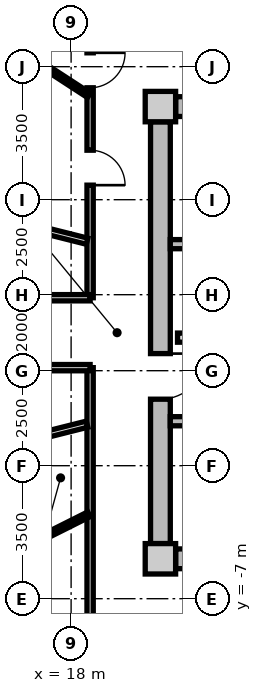
"""IFC4 building model, lengths in metres.
Left out: names, types, materials, properties, quantities, classifications, styles, units other than length and angle.
Written with IfcOpenShell. Run it as: python <this file> out.ifc"""

import sys

from ifc_helpers import new_model, si_unit, direction, frame, frame_2d, origin, origin_2d, place, context, subcontext, project, spatial, rectangle, extrude, source, transform, mapped, element, fill, save


model = new_model("IFC4")
c1 = context("Model", 3, precision=1e-05, world=origin(), true_north=direction((0.0, 1.0)))
c2 = subcontext(c1, "Body", "Model", "MODEL_VIEW")
j1 = project(units=[si_unit("LENGTHUNIT", "METRE"), si_unit("PLANEANGLEUNIT", "RADIAN")], contexts=[c1])
p1 = place(None, origin())
s1 = spatial("IfcSite", under=j1, at=p1, CompositionType="ELEMENT")
p2 = place(p1, origin())
s2 = spatial("IfcBuilding", under=s1, at=p2, CompositionType="ELEMENT")
p3 = place(p2, frame((0.0, 0.0, 207.8)))
s3 = spatial("IfcBuildingStorey", under=s2, at=p3, CompositionType="ELEMENT", Elevation=207.8)
m1 = source(origin(), c2, "Body", "SweptSolid", [
    extrude(rectangle(XDim=0.8, YDim=0.8, at=origin_2d()), origin(), (0.0, 0.0, 1.0), 3.05),
])
for number, where, z_axis, x_axis in (
    (1, (20.35, -5.95, 0.0), (0.0, 0.0, 1.0), (1.0, 0.0, 0.0)),
    (2, (20.35, 5.95, 0.0), (0.0, 0.0, 1.0), (1.0, 0.0, 0.0)),
):
    element("IfcColumn", number, at=place(p3, frame(where, z_axis=z_axis, x_axis=x_axis)), inside=s3, PredefinedType="COLUMN", context=c2, shape_type="MappedRepresentation", body=[
        mapped(m1, transform((0.0, 0.0, 0.0), x_axis=(1.0, 0.0, 0.0), y_axis=(0.0, 1.0, 0.0), z_axis=(0.0, 0.0, 1.0), scale=1.0)),
    ])
m2 = source(origin(), c2, "Body", "SweptSolid", [
    extrude(rectangle(XDim=14.5, YDim=0.52, at=frame_2d((7.25, 0.0))), origin(), (0.0, 0.0, 1.0), 2.76),
])
for number, where, z_axis, x_axis in (
    (3, (20.75, 5.95, 0.0), (0.0, 0.0, 1.0), (1.0, 0.0, 0.0)),
    (4, (35.25, -5.95, 0.0), (0.0, 0.0, 1.0), (-1.0, 0.0, 0.0)),
):
    element("IfcWall", number, at=place(p3, frame(where, z_axis=z_axis, x_axis=x_axis)), inside=s3, PredefinedType="SHEAR", context=c2, shape_type="MappedRepresentation", body=[
        mapped(m2, transform((0.0, 0.0, 0.0), x_axis=(1.0, 0.0, 0.0), y_axis=(0.0, 1.0, 0.0), z_axis=(0.0, 0.0, 1.0), scale=1.0)),
    ])
m3 = source(origin(), c2, "Body", "SweptSolid", [
    extrude(rectangle(XDim=11.1, YDim=0.52, at=frame_2d((5.55, 0.0))), origin(), (0.0, 0.0, 1.0), 2.76),
])
p4 = place(p3, frame((20.35, -5.55, 0.0), z_axis=(0.0, 0.0, 1.0), x_axis=(0.0, 1.0, 0.0)))
e5 = element("IfcWall", 5, at=p4, inside=s3, PredefinedType="SHEAR", context=c2, shape_type="MappedRepresentation", body=[
    mapped(m3, transform((0.0, 0.0, 0.0), x_axis=(1.0, 0.0, 0.0), y_axis=(0.0, 1.0, 0.0), z_axis=(0.0, 0.0, 1.0), scale=1.0)),
])
p5 = place(p4, frame((3.8, 0.0, 0.0)))
e6 = element("IfcOpeningElement", 6, at=p5, cuts=e5, PredefinedType="OPENING", context=c2, shape_type="SweptSolid", body=[
    extrude(rectangle(XDim=1.2, YDim=2.15, at=frame_2d((0.6, 1.075))), frame((0.0, 0.27, 0.0), z_axis=(0.0, -1.0, 0.0), x_axis=(1.0, 0.0, 0.0)), (0.0, 0.0, 1.0), 0.54),
])
m4 = source(origin(), c2, "Body", "SweptSolid", [
    extrude(rectangle(XDim=7.93, YDim=0.24, at=frame_2d((3.965, 0.0))), origin(), (0.0, 0.0, 1.0), 2.76),
])
p6 = place(p3, frame((20.61, 2.33, 0.0), z_axis=(0.0, 0.0, 1.0), x_axis=(1.0, 0.0, 0.0)))
e7 = element("IfcWall", 7, at=p6, inside=s3, PredefinedType="PARTITIONING", context=c2, shape_type="MappedRepresentation", body=[
    mapped(m4, transform((0.0, 0.0, 0.0), x_axis=(1.0, 0.0, 0.0), y_axis=(0.0, 1.0, 0.0), z_axis=(0.0, 0.0, 1.0), scale=1.0)),
])
p7 = place(p3, frame((20.61, -2.33, 0.0), z_axis=(0.0, 0.0, 1.0), x_axis=(1.0, 0.0, 0.0)))
e8 = element("IfcWall", 8, at=p7, inside=s3, PredefinedType="PARTITIONING", context=c2, shape_type="MappedRepresentation", body=[
    mapped(m4, transform((0.0, 0.0, 0.0), x_axis=(1.0, 0.0, 0.0), y_axis=(0.0, 1.0, 0.0), z_axis=(0.0, 0.0, 1.0), scale=1.0)),
])
p8 = place(p7, frame((1.05, 0.0, 0.0)))
e9 = element("IfcOpeningElement", 9, at=p8, cuts=e8, PredefinedType="OPENING", context=c2, shape_type="SweptSolid", body=[
    extrude(rectangle(XDim=1.1, YDim=2.15, at=frame_2d((0.55, 1.075))), frame((0.0, 0.13, 0.0), z_axis=(0.0, -1.0, 0.0), x_axis=(1.0, 0.0, 0.0)), (0.0, 0.0, 1.0), 0.26),
])
m5 = source(origin(), c2, "Body", "SweptSolid", [
    extrude(rectangle(XDim=7.62, YDim=0.24, at=frame_2d((3.81, 0.0))), origin(), (0.0, 0.0, 1.0), 2.745),
])
p9 = place(p3, frame((20.8, -0.13, 0.0), z_axis=(0.0, 0.0, 1.0), x_axis=(1.0, 0.0, 0.0)))
e10 = element("IfcWall", 10, at=p9, inside=s3, PredefinedType="PARTITIONING", context=c2, shape_type="MappedRepresentation", body=[
    mapped(m5, transform((0.0, 0.0, 0.0), x_axis=(1.0, 0.0, 0.0), y_axis=(0.0, 1.0, 0.0), z_axis=(0.0, 0.0, 1.0), scale=1.0)),
])
p10 = place(p9, frame((6.22, 0.0, 0.0)))
e11 = element("IfcOpeningElement", 11, at=p10, cuts=e10, PredefinedType="OPENING", context=c2, shape_type="SweptSolid", body=[
    extrude(rectangle(XDim=1.0, YDim=2.1, at=frame_2d((0.5, 1.05))), frame((0.0, 0.13, 0.0), z_axis=(0.0, -1.0, 0.0), x_axis=(1.0, 0.0, 0.0)), (0.0, 0.0, 1.0), 0.26),
])
p11 = place(p9, frame((2.4, 0.0, 0.0)))
e12 = element("IfcOpeningElement", 12, at=p11, cuts=e10, PredefinedType="OPENING", context=c2, shape_type="SweptSolid", body=[
    extrude(rectangle(XDim=1.0, YDim=2.1, at=frame_2d((0.5, 1.05))), frame((0.0, 0.13, 0.0), z_axis=(0.0, -1.0, 0.0), x_axis=(1.0, 0.0, 0.0)), (0.0, 0.0, 1.0), 0.26),
])
m6 = source(origin(), c2, "Body", "SweptSolid", [
    extrude(rectangle(XDim=6.88, YDim=0.165, at=frame_2d((3.44, 0.0))), origin(), (0.0, 0.0, 1.0), 2.745),
])
p12 = place(p3, frame((18.5, -7.8, 0.0), z_axis=(0.0, 0.0, 1.0), x_axis=(0.0, 1.0, 0.0)))
e13 = element("IfcWall", 13, at=p12, inside=s3, PredefinedType="PARTITIONING", context=c2, shape_type="MappedRepresentation", body=[
    mapped(m6, transform((0.0, 0.0, 0.0), x_axis=(1.0, 0.0, 0.0), y_axis=(0.0, 1.0, 0.0), z_axis=(0.0, 0.0, 1.0), scale=1.0)),
])
p13 = place(p3, frame((18.5, 0.92, 0.0), z_axis=(0.0, 0.0, 1.0), x_axis=(0.0, 1.0, 0.0)))
e14 = element("IfcWall", 14, at=p13, inside=s3, PredefinedType="PARTITIONING", context=c2, shape_type="MappedRepresentation", body=[
    mapped(m6, transform((0.0, 0.0, 0.0), x_axis=(1.0, 0.0, 0.0), y_axis=(0.0, 1.0, 0.0), z_axis=(0.0, 0.0, 1.0), scale=1.0)),
])
p14 = place(p13, frame((5.525, 0.0, 0.0)))
e15 = element("IfcOpeningElement", 15, at=p14, cuts=e14, PredefinedType="OPENING", context=c2, shape_type="SweptSolid", body=[
    extrude(rectangle(XDim=0.92, YDim=2.1, at=frame_2d((0.46, 1.05))), frame((0.0, 0.093, 0.0), z_axis=(0.0, -1.0, 0.0), x_axis=(1.0, 0.0, 0.0)), (0.0, 0.0, 1.0), 0.185),
])
p15 = place(p13, frame((2.962, 0.0, 0.0)))
e16 = element("IfcOpeningElement", 16, at=p15, cuts=e14, PredefinedType="OPENING", context=c2, shape_type="SweptSolid", body=[
    extrude(rectangle(XDim=0.92, YDim=2.1, at=frame_2d((0.46, 1.05))), frame((0.0, 0.093, 0.0), z_axis=(0.0, -1.0, 0.0), x_axis=(1.0, 0.0, 0.0)), (0.0, 0.0, 1.0), 0.185),
])
m7 = source(origin(), c2, "Body", "SweptSolid", [
    extrude(rectangle(XDim=6.157, YDim=0.165, at=frame_2d((3.079, 0.0))), origin(), (0.0, 0.0, 1.0), 2.345),
])
for number, where, z_axis, x_axis in (
    (17, (18.42, 2.407, 0.0), (0.0, 0.0, 1.0), (-0.97, 0.244, 0.0)),
    (18, (18.42, -2.407, 0.0), (0.0, 0.0, 1.0), (-0.97, -0.244, 0.0)),
):
    element("IfcWall", number, at=place(p3, frame(where, z_axis=z_axis, x_axis=x_axis)), inside=s3, PredefinedType="PARTITIONING", context=c2, shape_type="MappedRepresentation", body=[
        mapped(m7, transform((0.0, 0.0, 0.0), x_axis=(1.0, 0.0, 0.0), y_axis=(0.0, 1.0, 0.0), z_axis=(0.0, 0.0, 1.0), scale=1.0)),
    ])
m8 = source(origin(), c2, "Body", "SweptSolid", [
    extrude(rectangle(XDim=3.904, YDim=0.14, at=frame_2d((1.952, 0.0))), origin(), (0.0, 0.0, 1.0), 2.745),
])
p16 = place(p3, frame((18.47, 6.246, 0.0), z_axis=(0.0, 0.0, 1.0), x_axis=(-0.838024687996, 0.545632314209, 0.0)))
e19 = element("IfcWall", 19, at=p16, inside=s3, PredefinedType="PARTITIONING", context=c2, shape_type="MappedRepresentation", body=[
    mapped(m8, transform((0.0, 0.0, 0.0), x_axis=(1.0, 0.0, 0.0), y_axis=(0.0, 1.0, 0.0), z_axis=(0.0, 0.0, 1.0), scale=1.0)),
])
m9 = source(origin(), c2, "Body", "SweptSolid", [
    extrude(rectangle(XDim=1.638, YDim=0.14, at=frame_2d((0.819, 0.0))), origin(), (0.0, 0.0, 1.0), 2.745),
])
p17 = place(p3, frame((18.47, -4.778, 0.0), z_axis=(0.0, 0.0, 1.0), x_axis=(-0.893919977945, -0.448226586707, 0.0)))
e20 = element("IfcWall", 20, at=p17, inside=s3, PredefinedType="PARTITIONING", context=c2, shape_type="MappedRepresentation", body=[
    mapped(m9, transform((0.0, 0.0, 0.0), x_axis=(1.0, 0.0, 0.0), y_axis=(0.0, 1.0, 0.0), z_axis=(0.0, 0.0, 1.0), scale=1.0)),
])
m10 = source(origin(), c2, "Body", "SweptSolid", [
    extrude(rectangle(XDim=3.472, YDim=0.115, at=frame_2d((1.736, 0.0))), origin(), (0.0, 0.0, 1.0), 2.745),
])
p18 = place(p3, frame((16.396, -6.317, 0.0), z_axis=(0.0, 0.0, 1.0), x_axis=(0.485804139346, -0.874067696574, 0.0)))
e21 = element("IfcWall", 21, at=p18, inside=s3, PredefinedType="PARTITIONING", context=c2, shape_type="MappedRepresentation", body=[
    mapped(m10, transform((0.0, 0.0, 0.0), x_axis=(1.0, 0.0, 0.0), y_axis=(0.0, 1.0, 0.0), z_axis=(0.0, 0.0, 1.0), scale=1.0)),
])
p19 = place(p18, frame((1.261, 0.0, 0.0)))
e22 = element("IfcOpeningElement", 22, at=p19, cuts=e21, PredefinedType="OPENING", context=c2, shape_type="SweptSolid", body=[
    extrude(rectangle(XDim=0.95, YDim=2.1, at=frame_2d((0.475, 1.05))), frame((0.0, 0.067, 0.0), z_axis=(0.0, -1.0, 0.0), x_axis=(1.0, 0.0, 0.0)), (0.0, 0.0, 1.0), 0.135),
])
m11 = source(origin(), c2, "Body", "SweptSolid", [
    extrude(rectangle(XDim=37.0, YDim=0.165, at=frame_2d((18.5, 0.0))), origin(), (0.0, 0.0, 1.0), 2.745),
])
p20 = place(p3, frame((-18.5, -0.92, 0.0), z_axis=(0.0, 0.0, 1.0), x_axis=(1.0, 0.0, 0.0)))
e23 = element("IfcWall", 23, at=p20, inside=s3, PredefinedType="PARTITIONING", context=c2, shape_type="MappedRepresentation", body=[
    mapped(m11, transform((0.0, 0.0, 0.0), x_axis=(1.0, 0.0, 0.0), y_axis=(0.0, 1.0, 0.0), z_axis=(0.0, 0.0, 1.0), scale=1.0)),
])
p21 = place(p20, frame((2.662, 0.0, 0.0)))
e24 = element("IfcOpeningElement", 24, at=p21, cuts=e23, PredefinedType="OPENING", context=c2, shape_type="SweptSolid", body=[
    extrude(rectangle(XDim=0.95, YDim=2.1, at=frame_2d((0.475, 1.05))), frame((0.0, 0.093, 0.0), z_axis=(0.0, -1.0, 0.0), x_axis=(1.0, 0.0, 0.0)), (0.0, 0.0, 1.0), 0.185),
])
p22 = place(p20, frame((33.388, 0.0, 0.0)))
e25 = element("IfcOpeningElement", 25, at=p22, cuts=e23, PredefinedType="OPENING", context=c2, shape_type="SweptSolid", body=[
    extrude(rectangle(XDim=0.95, YDim=2.1, at=frame_2d((0.475, 1.05))), frame((0.0, 0.093, 0.0), z_axis=(0.0, -1.0, 0.0), x_axis=(1.0, 0.0, 0.0)), (0.0, 0.0, 1.0), 0.185),
])
p23 = place(p20, frame((9.075, 0.0, 0.0)))
e26 = element("IfcOpeningElement", 26, at=p23, cuts=e23, PredefinedType="OPENING", context=c2, shape_type="SweptSolid", body=[
    extrude(rectangle(XDim=1.25, YDim=2.2, at=frame_2d((0.625, 1.1))), frame((0.0, 0.093, 0.0), z_axis=(0.0, -1.0, 0.0), x_axis=(1.0, 0.0, 0.0)), (0.0, 0.0, 1.0), 0.185),
])
p24 = place(p20, frame((14.875, 0.0, 0.0)))
e27 = element("IfcOpeningElement", 27, at=p24, cuts=e23, PredefinedType="OPENING", context=c2, shape_type="SweptSolid", body=[
    extrude(rectangle(XDim=1.25, YDim=2.2, at=frame_2d((0.625, 1.1))), frame((0.0, 0.093, 0.0), z_axis=(0.0, -1.0, 0.0), x_axis=(1.0, 0.0, 0.0)), (0.0, 0.0, 1.0), 0.185),
])
p25 = place(p20, frame((20.875, 0.0, 0.0)))
e28 = element("IfcOpeningElement", 28, at=p25, cuts=e23, PredefinedType="OPENING", context=c2, shape_type="SweptSolid", body=[
    extrude(rectangle(XDim=1.25, YDim=2.2, at=frame_2d((0.625, 1.1))), frame((0.0, 0.093, 0.0), z_axis=(0.0, -1.0, 0.0), x_axis=(1.0, 0.0, 0.0)), (0.0, 0.0, 1.0), 0.185),
])
p26 = place(p20, frame((26.675, 0.0, 0.0)))
e29 = element("IfcOpeningElement", 29, at=p26, cuts=e23, PredefinedType="OPENING", context=c2, shape_type="SweptSolid", body=[
    extrude(rectangle(XDim=1.25, YDim=2.2, at=frame_2d((0.625, 1.1))), frame((0.0, 0.093, 0.0), z_axis=(0.0, -1.0, 0.0), x_axis=(1.0, 0.0, 0.0)), (0.0, 0.0, 1.0), 0.185),
])
p27 = place(p3, frame((-18.5, 0.92, 0.0), z_axis=(0.0, 0.0, 1.0), x_axis=(1.0, 0.0, 0.0)))
e30 = element("IfcWall", 30, at=p27, inside=s3, PredefinedType="PARTITIONING", context=c2, shape_type="MappedRepresentation", body=[
    mapped(m11, transform((0.0, 0.0, 0.0), x_axis=(1.0, 0.0, 0.0), y_axis=(0.0, 1.0, 0.0), z_axis=(0.0, 0.0, 1.0), scale=1.0)),
])
p28 = place(p27, frame((2.662, 0.0, 0.0)))
e31 = element("IfcOpeningElement", 31, at=p28, cuts=e30, PredefinedType="OPENING", context=c2, shape_type="SweptSolid", body=[
    extrude(rectangle(XDim=0.95, YDim=2.1, at=frame_2d((0.475, 1.05))), frame((0.0, 0.093, 0.0), z_axis=(0.0, -1.0, 0.0), x_axis=(1.0, 0.0, 0.0)), (0.0, 0.0, 1.0), 0.185),
])
p29 = place(p27, frame((33.388, 0.0, 0.0)))
e32 = element("IfcOpeningElement", 32, at=p29, cuts=e30, PredefinedType="OPENING", context=c2, shape_type="SweptSolid", body=[
    extrude(rectangle(XDim=0.95, YDim=2.1, at=frame_2d((0.475, 1.05))), frame((0.0, 0.093, 0.0), z_axis=(0.0, -1.0, 0.0), x_axis=(1.0, 0.0, 0.0)), (0.0, 0.0, 1.0), 0.185),
])
p30 = place(p27, frame((7.64, 0.0, 0.0)))
e33 = element("IfcOpeningElement", 33, at=p30, cuts=e30, PredefinedType="OPENING", context=c2, shape_type="SweptSolid", body=[
    extrude(rectangle(XDim=0.92, YDim=2.1, at=frame_2d((0.46, 1.05))), frame((0.0, 0.093, 0.0), z_axis=(0.0, -1.0, 0.0), x_axis=(1.0, 0.0, 0.0)), (0.0, 0.0, 1.0), 0.185),
])
p31 = place(p27, frame((10.275, 0.0, 0.0)))
e34 = element("IfcOpeningElement", 34, at=p31, cuts=e30, PredefinedType="OPENING", context=c2, shape_type="SweptSolid", body=[
    extrude(rectangle(XDim=1.25, YDim=2.2, at=frame_2d((0.625, 1.1))), frame((0.0, 0.093, 0.0), z_axis=(0.0, -1.0, 0.0), x_axis=(1.0, 0.0, 0.0)), (0.0, 0.0, 1.0), 0.185),
])
p32 = place(p27, frame((14.875, 0.0, 0.0)))
e35 = element("IfcOpeningElement", 35, at=p32, cuts=e30, PredefinedType="OPENING", context=c2, shape_type="SweptSolid", body=[
    extrude(rectangle(XDim=1.25, YDim=2.2, at=frame_2d((0.625, 1.1))), frame((0.0, 0.093, 0.0), z_axis=(0.0, -1.0, 0.0), x_axis=(1.0, 0.0, 0.0)), (0.0, 0.0, 1.0), 0.185),
])
p33 = place(p27, frame((20.875, 0.0, 0.0)))
e36 = element("IfcOpeningElement", 36, at=p33, cuts=e30, PredefinedType="OPENING", context=c2, shape_type="SweptSolid", body=[
    extrude(rectangle(XDim=1.25, YDim=2.2, at=frame_2d((0.625, 1.1))), frame((0.0, 0.093, 0.0), z_axis=(0.0, -1.0, 0.0), x_axis=(1.0, 0.0, 0.0)), (0.0, 0.0, 1.0), 0.185),
])
p34 = place(p27, frame((26.675, 0.0, 0.0)))
e37 = element("IfcOpeningElement", 37, at=p34, cuts=e30, PredefinedType="OPENING", context=c2, shape_type="SweptSolid", body=[
    extrude(rectangle(XDim=1.25, YDim=2.2, at=frame_2d((0.625, 1.1))), frame((0.0, 0.093, 0.0), z_axis=(0.0, -1.0, 0.0), x_axis=(1.0, 0.0, 0.0)), (0.0, 0.0, 1.0), 0.185),
])
m12 = source(origin(), c2, "Body", "SweptSolid", [
    extrude(rectangle(XDim=1.2, YDim=2.15, at=frame_2d((0.6, 1.075))), frame((0.0, 0.025, 0.0), z_axis=(0.0, -1.0, 0.0), x_axis=(1.0, 0.0, 0.0)), (0.0, 0.0, 1.0), 0.05),
])
p35 = place(p5, frame((1.2, 0.0, 0.0), z_axis=(0.0, 0.0, 1.0), x_axis=(-1.0, 0.0, 0.0)))
e38 = element("IfcDoor", 38, at=p35, inside=s3, OperationType="SINGLE_SWING_LEFT", PredefinedType="DOOR", context=c2, shape_type="MappedRepresentation", body=[
    mapped(m12, transform((0.0, 0.0, 0.0), x_axis=(1.0, 0.0, 0.0), y_axis=(0.0, 1.0, 0.0), z_axis=(0.0, 0.0, 1.0), scale=1.0)),
])
fill(e6, e38)
m13 = source(origin(), c2, "Body", "SweptSolid", [
    extrude(rectangle(XDim=0.92, YDim=2.1, at=frame_2d((0.46, 1.05))), frame((0.0, 0.025, 0.0), z_axis=(0.0, -1.0, 0.0), x_axis=(1.0, 0.0, 0.0)), (0.0, 0.0, 1.0), 0.05),
])
p36 = place(p14, frame((0.92, 0.0, 0.0), z_axis=(0.0, 0.0, 1.0), x_axis=(-1.0, 0.0, 0.0)))
e39 = element("IfcDoor", 39, at=p36, inside=s3, OperationType="SINGLE_SWING_LEFT", PredefinedType="DOOR", context=c2, shape_type="MappedRepresentation", body=[
    mapped(m13, transform((0.0, 0.0, 0.0), x_axis=(1.0, 0.0, 0.0), y_axis=(0.0, 1.0, 0.0), z_axis=(0.0, 0.0, 1.0), scale=1.0)),
])
fill(e15, e39)
p37 = place(p15, frame((0.92, 0.0, 0.0), z_axis=(0.0, 0.0, 1.0), x_axis=(-1.0, 0.0, 0.0)))
e40 = element("IfcDoor", 40, at=p37, inside=s3, OperationType="SINGLE_SWING_RIGHT", PredefinedType="DOOR", context=c2, shape_type="MappedRepresentation", body=[
    mapped(m13, transform((0.0, 0.0, 0.0), x_axis=(1.0, 0.0, 0.0), y_axis=(0.0, 1.0, 0.0), z_axis=(0.0, 0.0, 1.0), scale=1.0)),
])
fill(e16, e40)
save(model, sys.argv[1])
